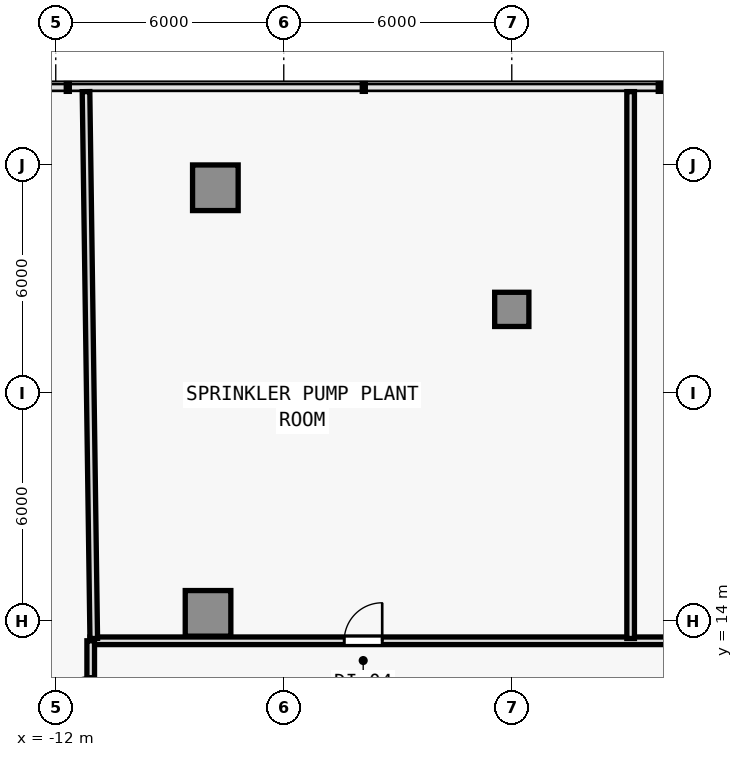
"""IFC4 building model, lengths in metres.
Left out: names, types, materials, properties, quantities, classifications, styles, units other than length and angle.
Written with IfcOpenShell. Run it as: python <this file> out.ifc"""

import sys

from ifc_helpers import new_model, si_unit, direction, frame, frame_2d, origin, origin_2d, place, context, subcontext, project, spatial, rectangle, extrude, element, fill, save


model = new_model("IFC4")
c1 = context("Model", 3, precision=1e-05, world=origin(), true_north=direction((0.0, 1.0)))
c2 = subcontext(c1, "Body", "Model", "MODEL_VIEW")
j1 = project(units=[si_unit("LENGTHUNIT", "METRE"), si_unit("PLANEANGLEUNIT", "RADIAN")], contexts=[c1])
p1 = place(None, origin())
s1 = spatial("IfcSite", under=j1, at=p1, CompositionType="ELEMENT")
p2 = place(p1, origin())
s2 = spatial("IfcBuilding", under=s1, at=p2, CompositionType="ELEMENT")
p3 = place(p2, frame((0.0, 0.0, 21.8)))
s3 = spatial("IfcBuildingStorey", under=s2, at=p3, CompositionType="ELEMENT", Elevation=21.8)
for number, where, z_axis, x_axis in (
    (1, (-7.8, 25.4, 0.0), (0.0, 0.0, 1.0), (1.0, 0.0, 0.0)),
    (2, (-7.992, 14.202, 0.0), (0.0, 0.0, 1.0), (1.0, 0.0, 0.0)),
):
    element("IfcColumn", number, at=place(p3, frame(where, z_axis=z_axis, x_axis=x_axis)), inside=s3, PredefinedType="COLUMN", context=c2, shape_type="SweptSolid", body=[
        extrude(rectangle(XDim=1.2, YDim=1.2, at=origin_2d()), origin(), (0.0, 0.0, 1.0), 4.6),
    ])
p4 = place(p3, frame((0.0, 22.2, 0.0), z_axis=(0.0, 0.0, 1.0), x_axis=(1.0, 0.0, 0.0)))
e3 = element("IfcColumn", 3, at=p4, inside=s3, PredefinedType="COLUMN", context=c2, shape_type="SweptSolid", body=[
    extrude(rectangle(XDim=0.9, YDim=0.9, at=origin_2d()), origin(), (0.0, 0.0, 1.0), 4.6),
])
p5 = place(p3, frame((-11.1, 13.48, 0.0), z_axis=(0.0, 0.0, 1.0), x_axis=(1.0, 0.0, 0.0)))
e4 = element("IfcWall", 4, at=p5, inside=s3, PredefinedType="SOLIDWALL", context=c2, shape_type="SweptSolid", body=[
    extrude(rectangle(XDim=25.3, YDim=0.2, at=frame_2d((12.65, 0.0))), origin(), (0.0, 0.0, 1.0), 3.025),
])
p6 = place(p5, frame((19.187, 0.0, 0.0)))
e5 = element("IfcOpeningElement", 5, at=p6, cuts=e4, PredefinedType="OPENING", context=c2, shape_type="SweptSolid", body=[
    extrude(rectangle(XDim=1.0, YDim=2.15, at=frame_2d((0.5, 1.075))), frame((0.0, 0.11, 0.0), z_axis=(0.0, -1.0, 0.0), x_axis=(1.0, 0.0, 0.0)), (0.0, 0.0, 1.0), 0.22),
])
p7 = place(p5, frame((6.69, 0.0, 0.0)))
e6 = element("IfcOpeningElement", 6, at=p7, cuts=e4, PredefinedType="OPENING", context=c2, shape_type="SweptSolid", body=[
    extrude(rectangle(XDim=1.0, YDim=2.15, at=frame_2d((0.5, 1.075))), frame((0.0, 0.11, 0.0), z_axis=(0.0, -1.0, 0.0), x_axis=(1.0, 0.0, 0.0)), (0.0, 0.0, 1.0), 0.22),
])
p8 = place(p3, frame((-11.08, -12.68, 0.0), z_axis=(0.0, 0.0, 1.0), x_axis=(0.0, 1.0, 0.0)))
e7 = element("IfcWall", 7, at=p8, inside=s3, PredefinedType="SOLIDWALL", context=c2, shape_type="SweptSolid", body=[
    extrude(rectangle(XDim=26.16, YDim=0.2, at=frame_2d((13.08, 0.0))), origin(), (0.0, 0.0, 1.0), 3.025),
])
p9 = place(p8, frame((4.02, 0.0, 0.0)))
e8 = element("IfcOpeningElement", 8, at=p9, cuts=e7, PredefinedType="OPENING", context=c2, shape_type="SweptSolid", body=[
    extrude(rectangle(XDim=1.0, YDim=2.15, at=frame_2d((0.5, 1.075))), frame((0.0, 0.11, 0.0), z_axis=(0.0, -1.0, 0.0), x_axis=(1.0, 0.0, 0.0)), (0.0, 0.0, 1.0), 0.22),
])
p10 = place(p8, frame((24.22, 0.0, 0.0)))
e9 = element("IfcOpeningElement", 9, at=p10, cuts=e7, PredefinedType="OPENING", context=c2, shape_type="SweptSolid", body=[
    extrude(rectangle(XDim=1.0, YDim=2.15, at=frame_2d((0.5, 1.075))), frame((0.0, 0.11, 0.0), z_axis=(0.0, -1.0, 0.0), x_axis=(1.0, 0.0, 0.0)), (0.0, 0.0, 1.0), 0.22),
])
p11 = place(p8, frame((15.66, 0.0, 0.0)))
e10 = element("IfcOpeningElement", 10, at=p11, cuts=e7, PredefinedType="OPENING", context=c2, shape_type="SweptSolid", body=[
    extrude(rectangle(XDim=1.0, YDim=2.15, at=frame_2d((0.5, 1.075))), frame((0.0, 0.11, 0.0), z_axis=(0.0, -1.0, 0.0), x_axis=(1.0, 0.0, 0.0)), (0.0, 0.0, 1.0), 0.22),
])
p12 = place(p3, frame((3.127, 13.54, 0.0), z_axis=(0.0, 0.0, 1.0), x_axis=(0.0, 1.0, 0.0)))
e11 = element("IfcWall", 11, at=p12, inside=s3, PredefinedType="SOLIDWALL", context=c2, shape_type="SweptSolid", body=[
    extrude(rectangle(XDim=14.39, YDim=0.2, at=frame_2d((7.195, 0.0))), origin(), (0.0, 0.0, 1.0), 2.925),
])
p13 = place(p3, frame((-11.0, 13.54, 0.0), z_axis=(0.0, 0.0, 1.0), x_axis=(-0.014148326679, 0.999899907417, 0.0)))
e12 = element("IfcWall", 12, at=p13, inside=s3, PredefinedType="SOLIDWALL", context=c2, shape_type="SweptSolid", body=[
    extrude(rectangle(XDim=14.391, YDim=0.2, at=frame_2d((7.196, 0.0))), origin(), (0.0, 0.0, 1.0), 3.317),
])
p14 = place(p7, origin())
e13 = element("IfcDoor", 13, at=p14, inside=s3, OperationType="SINGLE_SWING_RIGHT", PredefinedType="DOOR", context=c2, shape_type="SweptSolid", body=[
    extrude(rectangle(XDim=1.0, YDim=2.15, at=frame_2d((0.5, 1.075))), frame((0.0, 0.025, 0.0), z_axis=(0.0, -1.0, 0.0), x_axis=(1.0, 0.0, 0.0)), (0.0, 0.0, 1.0), 0.05),
])
fill(e6, e13)
save(model, sys.argv[1])
